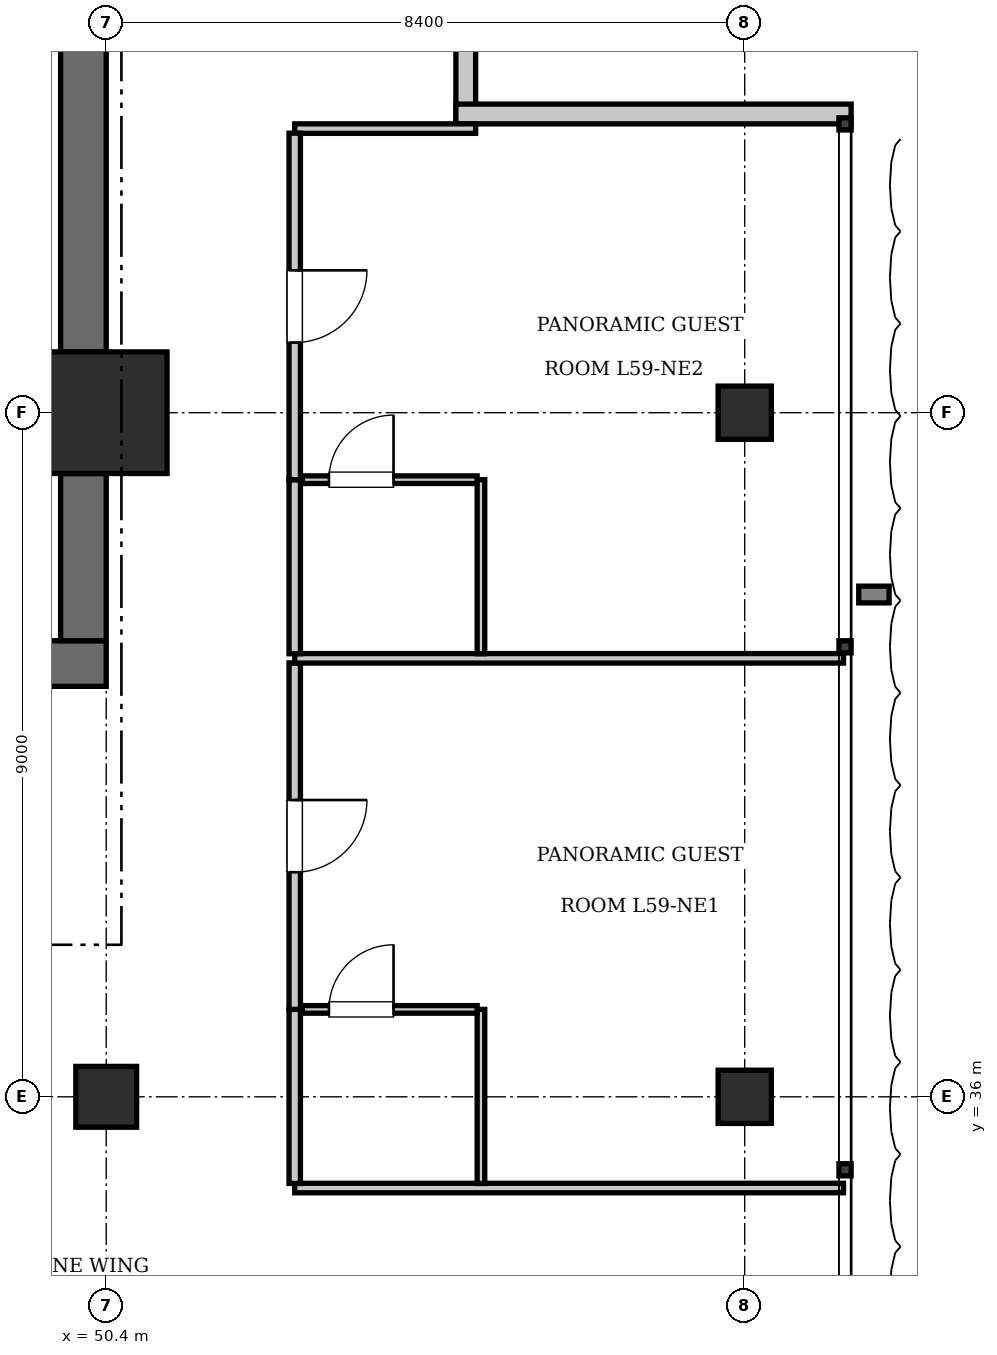
"""IFC4 building model, lengths in metres.
Left out: names, types, materials, properties, quantities, classifications, styles, units other than length and angle.
Written with IfcOpenShell. Run it as: python <this file> out.ifc"""

import sys

from ifc_helpers import new_model, si_unit, direction, frame, frame_2d, origin, origin_2d, place, context, subcontext, project, spatial, rectangle, extrude, element, fill, save


model = new_model("IFC4")
c1 = context("Model", 3, precision=1e-05, world=origin(), true_north=direction((0.0, 1.0)))
c2 = subcontext(c1, "Body", "Model", "MODEL_VIEW")
j1 = project(units=[si_unit("LENGTHUNIT", "METRE"), si_unit("PLANEANGLEUNIT", "RADIAN")], contexts=[c1])
p1 = place(None, origin())
s1 = spatial("IfcSite", under=j1, at=p1, CompositionType="ELEMENT")
p2 = place(p1, origin())
s2 = spatial("IfcBuilding", under=s1, at=p2, CompositionType="ELEMENT")
p3 = place(p2, frame((0.0, 0.0, 243.25)))
s3 = spatial("IfcBuildingStorey", under=s2, at=p3, CompositionType="ELEMENT", Elevation=243.25)
p4 = place(p3, frame((50.4, 45.0, 0.0), z_axis=(0.0, 0.0, 1.0), x_axis=(1.0, 0.0, 0.0)))
e1 = element("IfcColumn", 1, at=p4, inside=s3, PredefinedType="COLUMN", context=c2, shape_type="SweptSolid", body=[
    extrude(rectangle(XDim=1.6, YDim=1.6, at=origin_2d()), origin(), (0.0, 0.0, 1.0), 3.85),
])
p5 = place(p3, frame((43.6, 41.7, 0.0), z_axis=(0.0, 0.0, 1.0), x_axis=(1.0, 0.0, 0.0)))
e2 = element("IfcWall", 2, at=p5, inside=s3, PredefinedType="SHEAR", context=c2, shape_type="SweptSolid", body=[
    extrude(rectangle(XDim=6.8, YDim=0.6, at=frame_2d((3.4, 0.0))), origin(), (0.0, 0.0, 1.0), 3.85),
])
p6 = place(p5, frame((3.9, 0.0, 0.0)))
e3 = element("IfcOpeningElement", 3, at=p6, cuts=e2, PredefinedType="OPENING", context=c2, shape_type="SweptSolid", body=[
    extrude(rectangle(XDim=1.15, YDim=2.15, at=frame_2d((0.575, 1.075))), frame((0.0, 0.31, 0.0), z_axis=(0.0, -1.0, 0.0), x_axis=(1.0, 0.0, 0.0)), (0.0, 0.0, 1.0), 0.62),
])
p7 = place(p5, frame((0.55, 0.0, 0.0)))
e4 = element("IfcOpeningElement", 4, at=p7, cuts=e2, PredefinedType="OPENING", context=c2, shape_type="SweptSolid", body=[
    extrude(rectangle(XDim=1.1, YDim=2.2, at=frame_2d((0.55, 1.1))), frame((0.0, 0.31, 0.0), z_axis=(0.0, -1.0, 0.0), x_axis=(1.0, 0.0, 0.0)), (0.0, 0.0, 1.0), 0.62),
])
p8 = place(p3, frame((50.1, 42.0, 0.0), z_axis=(0.0, 0.0, 1.0), x_axis=(0.0, 1.0, 0.0)))
e5 = element("IfcWall", 5, at=p8, inside=s3, PredefinedType="SHEAR", context=c2, shape_type="SweptSolid", body=[
    extrude(rectangle(XDim=2.2, YDim=0.6, at=frame_2d((1.1, 0.0))), origin(), (0.0, 0.0, 1.0), 3.85),
])
p9 = place(p3, frame((50.1, 45.8, 0.0), z_axis=(0.0, 0.0, 1.0), x_axis=(0.0, 1.0, 0.0)))
e6 = element("IfcWall", 6, at=p9, inside=s3, PredefinedType="SHEAR", context=c2, shape_type="SweptSolid", body=[
    extrude(rectangle(XDim=7.6, YDim=0.6, at=frame_2d((3.8, 0.0))), origin(), (0.0, 0.0, 1.0), 3.85),
])
p10 = place(p3, frame((50.4, 36.0, 0.0), z_axis=(0.0, 0.0, 1.0), x_axis=(1.0, 0.0, 0.0)))
e7 = element("IfcColumn", 7, at=p10, inside=s3, PredefinedType="COLUMN", context=c2, shape_type="SweptSolid", body=[
    extrude(rectangle(XDim=0.8, YDim=0.8, at=origin_2d()), origin(), (0.0, 0.0, 1.0), 3.85),
])
for number, where, z_axis, x_axis in (
    (8, (58.8, 36.0, 0.0), (0.0, 0.0, 1.0), (1.0, 0.0, 0.0)),
    (9, (58.8, 45.0, 0.0), (0.0, 0.0, 1.0), (1.0, 0.0, 0.0)),
):
    element("IfcColumn", number, at=place(p3, frame(where, z_axis=z_axis, x_axis=x_axis)), inside=s3, PredefinedType="COLUMN", context=c2, shape_type="SweptSolid", body=[
        extrude(rectangle(XDim=0.7, YDim=0.7, at=origin_2d()), origin(), (0.0, 0.0, 1.0), 3.85),
    ])
for number, where, z_axis, x_axis in (
    (10, (55.13, 54.0, 0.0), (0.0, 0.0, 1.0), (0.0, -1.0, 0.0)),
    (11, (55.0, 48.93, 0.0), (0.0, 0.0, 1.0), (1.0, 0.0, 0.0)),
):
    element("IfcWall", number, at=place(p3, frame(where, z_axis=z_axis, x_axis=x_axis)), inside=s3, PredefinedType="SOLIDWALL", context=c2, shape_type="SweptSolid", body=[
        extrude(rectangle(XDim=5.2, YDim=0.26, at=frame_2d((2.6, 0.0))), origin(), (0.0, 0.0, 1.0), 3.61),
    ])
p11 = place(p3, frame((52.88, 34.8, 0.0), z_axis=(0.0, 0.0, 1.0), x_axis=(1.0, 0.0, 0.0)))
e12 = element("IfcWall", 12, at=p11, inside=s3, PredefinedType="PARTITIONING", context=c2, shape_type="SweptSolid", body=[
    extrude(rectangle(XDim=7.22, YDim=0.125, at=frame_2d((3.61, 0.0))), origin(), (0.0, 0.0, 1.0), 3.61),
])
p12 = place(p3, frame((52.88, 48.738, 0.0), z_axis=(0.0, 0.0, 1.0), x_axis=(1.0, 0.0, 0.0)))
e13 = element("IfcWall", 13, at=p12, inside=s3, PredefinedType="PARTITIONING", context=c2, shape_type="SweptSolid", body=[
    extrude(rectangle(XDim=2.38, YDim=0.125, at=frame_2d((1.19, 0.0))), origin(), (0.0, 0.0, 1.0), 3.61),
])
p13 = place(p3, frame((52.88, 34.86, 0.0), z_axis=(0.0, 0.0, 1.0), x_axis=(0.0, 1.0, 0.0)))
e14 = element("IfcWall", 14, at=p13, inside=s3, PredefinedType="PARTITIONING", context=c2, shape_type="SweptSolid", body=[
    extrude(rectangle(XDim=2.29, YDim=0.15, at=frame_2d((1.145, 0.0))), origin(), (0.0, 0.0, 1.0), 3.61),
])
p14 = place(p3, frame((52.88, 37.15, 0.0), z_axis=(0.0, 0.0, 1.0), x_axis=(0.0, 1.0, 0.0)))
e15 = element("IfcWall", 15, at=p14, inside=s3, PredefinedType="PARTITIONING", context=c2, shape_type="SweptSolid", body=[
    extrude(rectangle(XDim=4.559, YDim=0.15, at=frame_2d((2.279, 0.0))), origin(), (0.0, 0.0, 1.0), 3.61),
])
p15 = place(p14, frame((1.804, 0.0, 0.0)))
e16 = element("IfcOpeningElement", 16, at=p15, cuts=e15, PredefinedType="OPENING", context=c2, shape_type="SweptSolid", body=[
    extrude(rectangle(XDim=0.95, YDim=2.15, at=frame_2d((0.475, 1.075))), frame((0.0, 0.085, 0.0), z_axis=(0.0, -1.0, 0.0), x_axis=(1.0, 0.0, 0.0)), (0.0, 0.0, 1.0), 0.17),
])
p16 = place(p3, frame((55.33, 34.86, 0.0), z_axis=(0.0, 0.0, 1.0), x_axis=(0.0, 1.0, 0.0)))
e17 = element("IfcWall", 17, at=p16, inside=s3, PredefinedType="PARTITIONING", context=c2, shape_type="SweptSolid", body=[
    extrude(rectangle(XDim=2.29, YDim=0.1, at=frame_2d((1.145, 0.0))), origin(), (0.0, 0.0, 1.0), 3.61),
])
p17 = place(p3, frame((52.98, 37.15, 0.0), z_axis=(0.0, 0.0, 1.0), x_axis=(1.0, 0.0, 0.0)))
e18 = element("IfcWall", 18, at=p17, inside=s3, PredefinedType="PARTITIONING", context=c2, shape_type="SweptSolid", body=[
    extrude(rectangle(XDim=2.3, YDim=0.1, at=frame_2d((1.15, 0.0))), origin(), (0.0, 0.0, 1.0), 3.61),
])
p18 = place(p17, frame((0.35, 0.0, 0.0)))
e19 = element("IfcOpeningElement", 19, at=p18, cuts=e18, PredefinedType="OPENING", context=c2, shape_type="SweptSolid", body=[
    extrude(rectangle(XDim=0.85, YDim=2.1, at=frame_2d((0.425, 1.05))), frame((0.0, 0.06, 0.0), z_axis=(0.0, -1.0, 0.0), x_axis=(1.0, 0.0, 0.0)), (0.0, 0.0, 1.0), 0.12),
])
p19 = place(p3, frame((52.88, 41.769, 0.0), z_axis=(0.0, 0.0, 1.0), x_axis=(1.0, 0.0, 0.0)))
e20 = element("IfcWall", 20, at=p19, inside=s3, PredefinedType="PARTITIONING", context=c2, shape_type="SweptSolid", body=[
    extrude(rectangle(XDim=7.22, YDim=0.125, at=frame_2d((3.61, 0.0))), origin(), (0.0, 0.0, 1.0), 3.61),
])
p20 = place(p3, frame((52.88, 41.829, 0.0), z_axis=(0.0, 0.0, 1.0), x_axis=(0.0, 1.0, 0.0)))
e21 = element("IfcWall", 21, at=p20, inside=s3, PredefinedType="PARTITIONING", context=c2, shape_type="SweptSolid", body=[
    extrude(rectangle(XDim=2.29, YDim=0.15, at=frame_2d((1.145, 0.0))), origin(), (0.0, 0.0, 1.0), 3.61),
])
p21 = place(p3, frame((52.88, 44.119, 0.0), z_axis=(0.0, 0.0, 1.0), x_axis=(0.0, 1.0, 0.0)))
e22 = element("IfcWall", 22, at=p21, inside=s3, PredefinedType="PARTITIONING", context=c2, shape_type="SweptSolid", body=[
    extrude(rectangle(XDim=4.559, YDim=0.15, at=frame_2d((2.279, 0.0))), origin(), (0.0, 0.0, 1.0), 3.61),
])
p22 = place(p21, frame((1.804, 0.0, 0.0)))
e23 = element("IfcOpeningElement", 23, at=p22, cuts=e22, PredefinedType="OPENING", context=c2, shape_type="SweptSolid", body=[
    extrude(rectangle(XDim=0.95, YDim=2.15, at=frame_2d((0.475, 1.075))), frame((0.0, 0.085, 0.0), z_axis=(0.0, -1.0, 0.0), x_axis=(1.0, 0.0, 0.0)), (0.0, 0.0, 1.0), 0.17),
])
p23 = place(p3, frame((55.33, 41.829, 0.0), z_axis=(0.0, 0.0, 1.0), x_axis=(0.0, 1.0, 0.0)))
e24 = element("IfcWall", 24, at=p23, inside=s3, PredefinedType="PARTITIONING", context=c2, shape_type="SweptSolid", body=[
    extrude(rectangle(XDim=2.29, YDim=0.1, at=frame_2d((1.145, 0.0))), origin(), (0.0, 0.0, 1.0), 3.61),
])
p24 = place(p3, frame((52.98, 44.119, 0.0), z_axis=(0.0, 0.0, 1.0), x_axis=(1.0, 0.0, 0.0)))
e25 = element("IfcWall", 25, at=p24, inside=s3, PredefinedType="PARTITIONING", context=c2, shape_type="SweptSolid", body=[
    extrude(rectangle(XDim=2.3, YDim=0.1, at=frame_2d((1.15, 0.0))), origin(), (0.0, 0.0, 1.0), 3.61),
])
p25 = place(p24, frame((0.35, 0.0, 0.0)))
e26 = element("IfcOpeningElement", 26, at=p25, cuts=e25, PredefinedType="OPENING", context=c2, shape_type="SweptSolid", body=[
    extrude(rectangle(XDim=0.85, YDim=2.1, at=frame_2d((0.425, 1.05))), frame((0.0, 0.06, 0.0), z_axis=(0.0, -1.0, 0.0), x_axis=(1.0, 0.0, 0.0)), (0.0, 0.0, 1.0), 0.12),
])
p26 = place(p18, origin())
e27 = element("IfcDoor", 27, at=p26, inside=s3, OperationType="SINGLE_SWING_RIGHT", PredefinedType="DOOR", context=c2, shape_type="SweptSolid", body=[
    extrude(rectangle(XDim=0.85, YDim=2.1, at=frame_2d((0.425, 1.05))), frame((0.0, 0.025, 0.0), z_axis=(0.0, -1.0, 0.0), x_axis=(1.0, 0.0, 0.0)), (0.0, 0.0, 1.0), 0.05),
])
fill(e19, e27)
p27 = place(p15, frame((0.95, 0.0, 0.0), z_axis=(0.0, 0.0, 1.0), x_axis=(-1.0, 0.0, 0.0)))
e28 = element("IfcDoor", 28, at=p27, inside=s3, OperationType="SINGLE_SWING_LEFT", PredefinedType="DOOR", context=c2, shape_type="SweptSolid", body=[
    extrude(rectangle(XDim=0.95, YDim=2.15, at=frame_2d((0.475, 1.075))), frame((0.0, 0.025, 0.0), z_axis=(0.0, -1.0, 0.0), x_axis=(1.0, 0.0, 0.0)), (0.0, 0.0, 1.0), 0.05),
])
fill(e16, e28)
p28 = place(p25, origin())
e29 = element("IfcDoor", 29, at=p28, inside=s3, OperationType="SINGLE_SWING_RIGHT", PredefinedType="DOOR", context=c2, shape_type="SweptSolid", body=[
    extrude(rectangle(XDim=0.85, YDim=2.1, at=frame_2d((0.425, 1.05))), frame((0.0, 0.025, 0.0), z_axis=(0.0, -1.0, 0.0), x_axis=(1.0, 0.0, 0.0)), (0.0, 0.0, 1.0), 0.05),
])
fill(e26, e29)
p29 = place(p22, frame((0.95, 0.0, 0.0), z_axis=(0.0, 0.0, 1.0), x_axis=(-1.0, 0.0, 0.0)))
e30 = element("IfcDoor", 30, at=p29, inside=s3, OperationType="SINGLE_SWING_LEFT", PredefinedType="DOOR", context=c2, shape_type="SweptSolid", body=[
    extrude(rectangle(XDim=0.95, YDim=2.15, at=frame_2d((0.475, 1.075))), frame((0.0, 0.025, 0.0), z_axis=(0.0, -1.0, 0.0), x_axis=(1.0, 0.0, 0.0)), (0.0, 0.0, 1.0), 0.05),
])
fill(e23, e30)
save(model, sys.argv[1])
